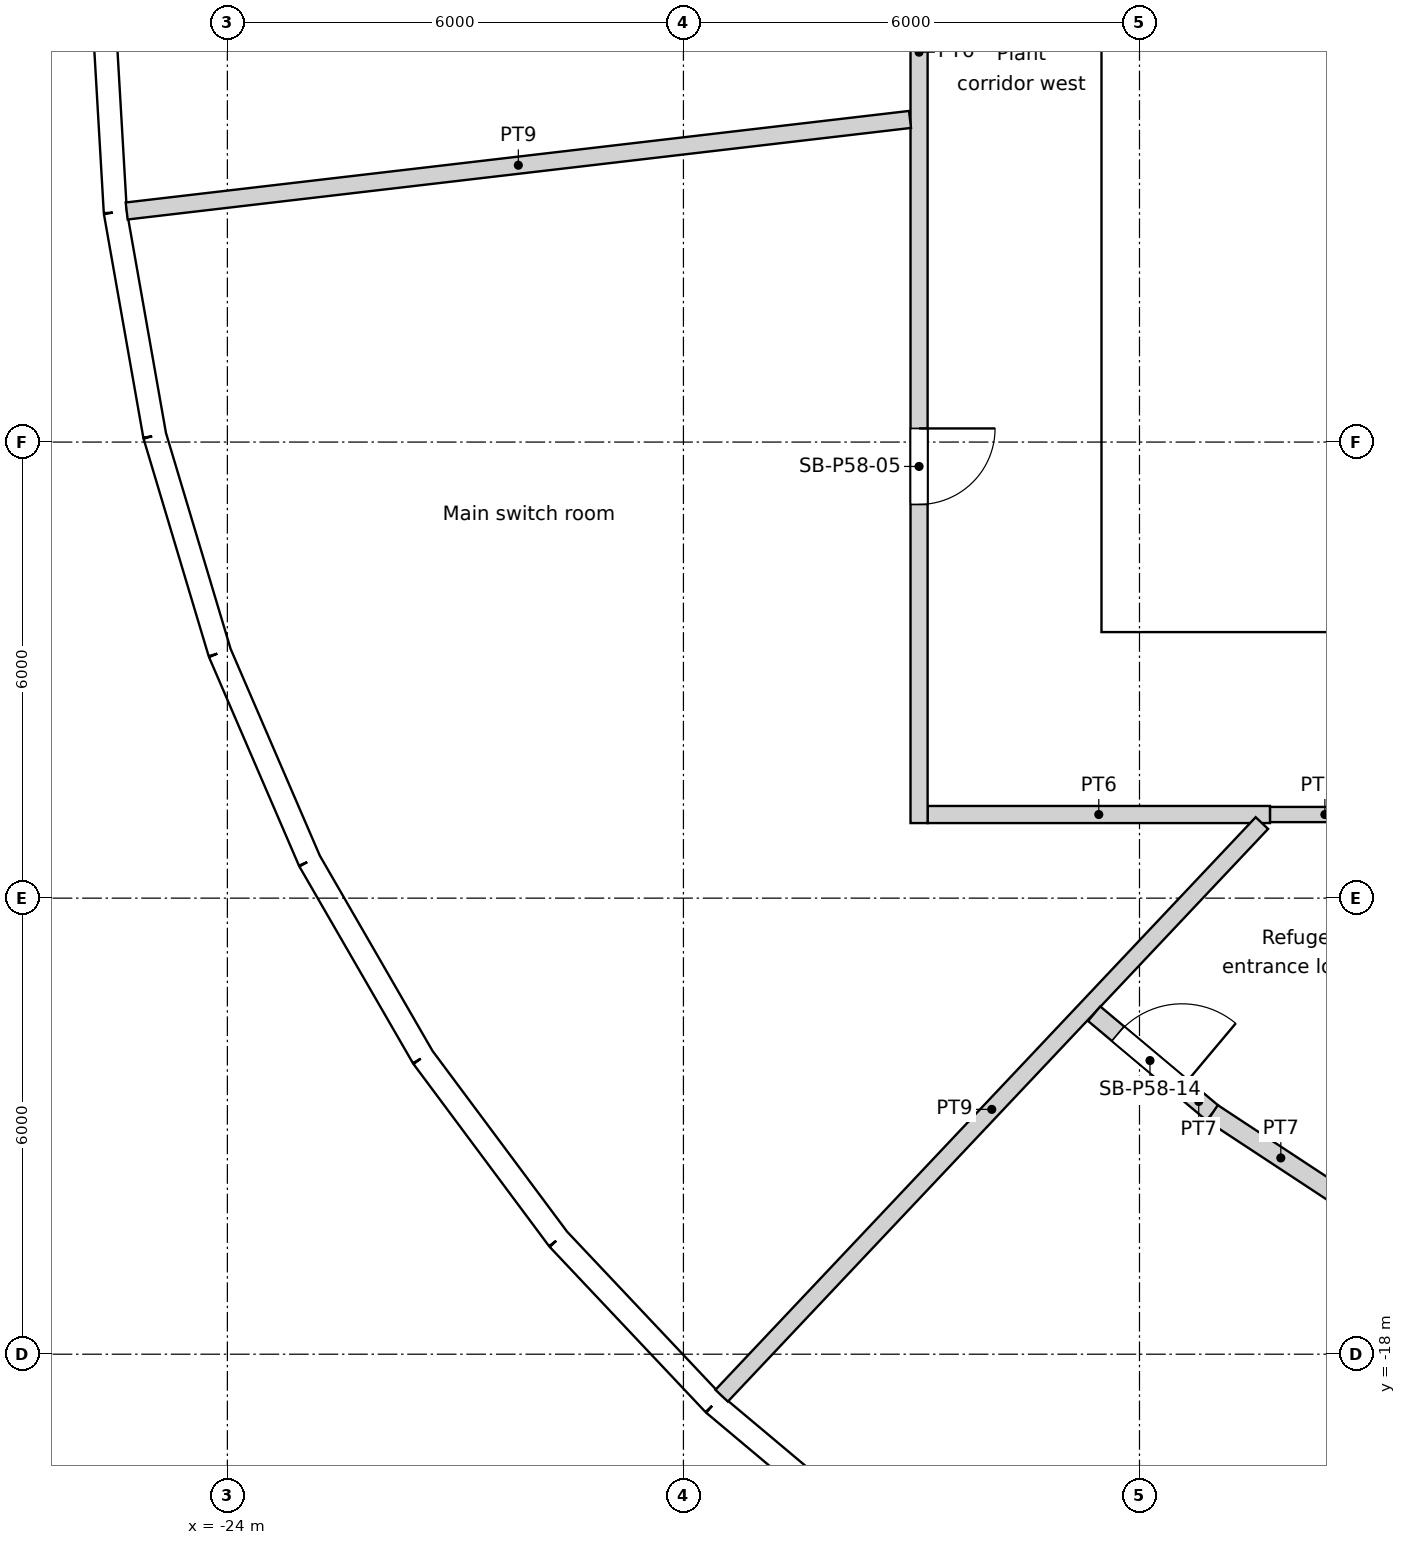
"""IFC4 building model, lengths in metres.
Left out: names, types, materials, properties, quantities, classifications, styles, units other than length and angle.
Written with IfcOpenShell. Run it as: python <this file> out.ifc"""

import sys

from ifc_helpers import new_model, si_unit, direction, frame, frame_2d, origin, origin_2d, place, context, subcontext, project, spatial, rectangle, circle, extrude, element, fill, save


model = new_model("IFC4")
c1 = context("Model", 3, precision=1e-05, world=origin(), true_north=direction((0.0, 1.0)))
c2 = subcontext(c1, "Body", "Model", "MODEL_VIEW")
j1 = project(units=[si_unit("LENGTHUNIT", "METRE"), si_unit("PLANEANGLEUNIT", "RADIAN")], contexts=[c1])
p1 = place(None, origin())
s1 = spatial("IfcSite", under=j1, at=p1, CompositionType="ELEMENT")
p2 = place(p1, origin())
s2 = spatial("IfcBuilding", under=s1, at=p2, CompositionType="ELEMENT")
p3 = place(p2, frame((0.0, 0.0, 225.0)))
s3 = spatial("IfcBuildingStorey", under=s2, at=p3, CompositionType="ELEMENT", Elevation=225.0)
for number, where, z_axis, x_axis in (
    (1, (-24.382, -2.85, 0.0), (0.0, 0.0, 1.0), (1.0, 0.0, 0.0)),
    (2, (-23.067, -8.396, 0.0), (0.0, 0.0, 1.0), (1.0, 0.0, 0.0)),
    (3, (-20.509, -13.489, 0.0), (0.0, 0.0, 1.0), (1.0, 0.0, 0.0)),
    (4, (-16.846, -17.855, 0.0), (0.0, 0.0, 1.0), (1.0, 0.0, 0.0)),
):
    element("IfcColumn", number, at=place(p3, frame(where, z_axis=z_axis, x_axis=x_axis)), inside=s3, PredefinedType="COLUMN", context=c2, shape_type="SweptSolid", body=[
        extrude(circle(Radius=0.6, at=origin_2d()), origin(), (0.0, 0.0, 1.0), 6.0),
    ])
for number, where, z_axis, x_axis in (
    (5, (-18.612, -2.805, 0.0), (0.0, 0.0, 1.0), (1.0, 0.0, 0.0)),
    (6, (-16.958, -8.167, 0.0), (0.0, 0.0, 1.0), (1.0, 0.0, 0.0)),
    (7, (-13.798, -12.802, 0.0), (0.0, 0.0, 1.0), (1.0, 0.0, 0.0)),
    (8, (-9.411, -16.301, 0.0), (0.0, 0.0, 1.0), (1.0, 0.0, 0.0)),
):
    element("IfcColumn", number, at=place(p3, frame(where, z_axis=z_axis, x_axis=x_axis)), inside=s3, PredefinedType="COLUMN", context=c2, shape_type="SweptSolid", body=[
        extrude(circle(Radius=0.65, at=origin_2d()), origin(), (0.0, 0.0, 1.0), 6.0),
    ])
p4 = place(p3, frame((-25.647, 0.0, 0.0), z_axis=(0.0, 0.0, 1.0), x_axis=(0.058117409476, -0.998309754894, 0.0)))
e9 = element("IfcWall", 9, at=p4, inside=s3, PredefinedType="SOLIDWALL", context=c2, shape_type="SweptSolid", body=[
    extrude(rectangle(XDim=2.983, YDim=0.3, at=frame_2d((1.491, 0.0))), origin(), (0.0, 0.0, 1.0), 5.65),
])
p5 = place(p4, frame((1.491, 0.0, 1.825)))
e10 = element("IfcOpeningElement", 10, at=p5, cuts=e9, PredefinedType="OPENING", context=c2, shape_type="SweptSolid", body=[
    extrude(circle(Radius=1.2, at=origin_2d()), frame((0.0, 0.16, 0.0), z_axis=(0.0, -1.0, 0.0), x_axis=(1.0, 0.0, 0.0)), (0.0, 0.0, 1.0), 0.32),
])
p6 = place(p3, frame((-25.474, -2.978, 0.0), z_axis=(0.0, 0.0, 1.0), x_axis=(0.17369661102, -0.984799211677, 0.0)))
e11 = element("IfcWall", 11, at=p6, inside=s3, PredefinedType="SOLIDWALL", context=c2, shape_type="SweptSolid", body=[
    extrude(rectangle(XDim=2.983, YDim=0.3, at=frame_2d((1.491, 0.0))), origin(), (0.0, 0.0, 1.0), 5.65),
])
p7 = place(p6, frame((1.491, 0.0, 1.825)))
e12 = element("IfcOpeningElement", 12, at=p7, cuts=e11, PredefinedType="OPENING", context=c2, shape_type="SweptSolid", body=[
    extrude(circle(Radius=1.2, at=origin_2d()), frame((0.0, 0.16, 0.0), z_axis=(0.0, -1.0, 0.0), x_axis=(1.0, 0.0, 0.0)), (0.0, 0.0, 1.0), 0.32),
])
p8 = place(p3, frame((-24.956, -5.915, 0.0), z_axis=(0.0, 0.0, 1.0), x_axis=(0.286754535355, -0.958004089998, 0.0)))
e13 = element("IfcWall", 13, at=p8, inside=s3, PredefinedType="SOLIDWALL", context=c2, shape_type="SweptSolid", body=[
    extrude(rectangle(XDim=2.982, YDim=0.3, at=frame_2d((1.491, 0.0))), origin(), (0.0, 0.0, 1.0), 5.65),
])
p9 = place(p8, frame((1.491, 0.0, 1.825)))
e14 = element("IfcOpeningElement", 14, at=p9, cuts=e13, PredefinedType="OPENING", context=c2, shape_type="SweptSolid", body=[
    extrude(circle(Radius=1.2, at=origin_2d()), frame((0.0, 0.16, 0.0), z_axis=(0.0, -1.0, 0.0), x_axis=(1.0, 0.0, 0.0)), (0.0, 0.0, 1.0), 0.32),
])
p10 = place(p3, frame((-24.101, -8.772, 0.0), z_axis=(0.0, 0.0, 1.0), x_axis=(0.396111410027, -0.918202456349, 0.0)))
e15 = element("IfcWall", 15, at=p10, inside=s3, PredefinedType="SOLIDWALL", context=c2, shape_type="SweptSolid", body=[
    extrude(rectangle(XDim=2.982, YDim=0.3, at=frame_2d((1.491, 0.0))), origin(), (0.0, 0.0, 1.0), 5.65),
])
p11 = place(p10, frame((1.491, 0.0, 1.825)))
e16 = element("IfcOpeningElement", 16, at=p11, cuts=e15, PredefinedType="OPENING", context=c2, shape_type="SweptSolid", body=[
    extrude(circle(Radius=1.2, at=origin_2d()), frame((0.0, 0.16, 0.0), z_axis=(0.0, -1.0, 0.0), x_axis=(1.0, 0.0, 0.0)), (0.0, 0.0, 1.0), 0.32),
])
p12 = place(p3, frame((-22.919, -11.51, 0.0), z_axis=(0.0, 0.0, 1.0), x_axis=(0.499977539641, -0.866038370891, 0.0)))
e17 = element("IfcWall", 17, at=p12, inside=s3, PredefinedType="SOLIDWALL", context=c2, shape_type="SweptSolid", body=[
    extrude(rectangle(XDim=2.983, YDim=0.3, at=frame_2d((1.491, 0.0))), origin(), (0.0, 0.0, 1.0), 5.65),
])
p13 = place(p12, frame((1.491, 0.0, 1.825)))
e18 = element("IfcOpeningElement", 18, at=p13, cuts=e17, PredefinedType="OPENING", context=c2, shape_type="SweptSolid", body=[
    extrude(circle(Radius=1.2, at=origin_2d()), frame((0.0, 0.16, 0.0), z_axis=(0.0, -1.0, 0.0), x_axis=(1.0, 0.0, 0.0)), (0.0, 0.0, 1.0), 0.32),
])
p14 = place(p3, frame((-21.428, -14.094, 0.0), z_axis=(0.0, 0.0, 1.0), x_axis=(0.597206768034, -0.802087324557, 0.0)))
e19 = element("IfcWall", 19, at=p14, inside=s3, PredefinedType="SOLIDWALL", context=c2, shape_type="SweptSolid", body=[
    extrude(rectangle(XDim=2.983, YDim=0.3, at=frame_2d((1.491, 0.0))), origin(), (0.0, 0.0, 1.0), 5.65),
])
p15 = place(p14, frame((1.491, 0.0, 1.825)))
e20 = element("IfcOpeningElement", 20, at=p15, cuts=e19, PredefinedType="OPENING", context=c2, shape_type="SweptSolid", body=[
    extrude(circle(Radius=1.2, at=origin_2d()), frame((0.0, 0.16, 0.0), z_axis=(0.0, -1.0, 0.0), x_axis=(1.0, 0.0, 0.0)), (0.0, 0.0, 1.0), 0.32),
])
p16 = place(p3, frame((-19.647, -16.486, 0.0), z_axis=(0.0, 0.0, 1.0), x_axis=(0.686219609698, -0.72739442345, 0.0)))
e21 = element("IfcWall", 21, at=p16, inside=s3, PredefinedType="SOLIDWALL", context=c2, shape_type="SweptSolid", body=[
    extrude(rectangle(XDim=2.982, YDim=0.3, at=frame_2d((1.491, 0.0))), origin(), (0.0, 0.0, 1.0), 5.65),
])
p17 = place(p16, frame((1.491, 0.0, 1.825)))
e22 = element("IfcOpeningElement", 22, at=p17, cuts=e21, PredefinedType="OPENING", context=c2, shape_type="SweptSolid", body=[
    extrude(circle(Radius=1.2, at=origin_2d()), frame((0.0, 0.16, 0.0), z_axis=(0.0, -1.0, 0.0), x_axis=(1.0, 0.0, 0.0)), (0.0, 0.0, 1.0), 0.32),
])
p18 = place(p3, frame((-17.6, -18.655, 0.0), z_axis=(0.0, 0.0, 1.0), x_axis=(0.766015999952, -0.64282150541, 0.0)))
e23 = element("IfcWall", 23, at=p18, inside=s3, PredefinedType="SOLIDWALL", context=c2, shape_type="SweptSolid", body=[
    extrude(rectangle(XDim=2.982, YDim=0.3, at=frame_2d((1.491, 0.0))), origin(), (0.0, 0.0, 1.0), 5.65),
])
p19 = place(p18, frame((1.491, 0.0, 1.825)))
e24 = element("IfcOpeningElement", 24, at=p19, cuts=e23, PredefinedType="OPENING", context=c2, shape_type="SweptSolid", body=[
    extrude(circle(Radius=1.2, at=origin_2d()), frame((0.0, 0.16, 0.0), z_axis=(0.0, -1.0, 0.0), x_axis=(1.0, 0.0, 0.0)), (0.0, 0.0, 1.0), 0.32),
])
p20 = place(p3, frame((-12.5, -8.05, 0.0), z_axis=(0.0, 0.0, 1.0), x_axis=(1.0, 0.0, 0.0)))
e25 = element("IfcWall", 25, at=p20, inside=s3, PredefinedType="SOLIDWALL", context=c2, shape_type="SweptSolid", body=[
    extrude(rectangle(XDim=25.0, YDim=0.9, at=frame_2d((12.5, 0.0))), origin(), (0.0, 0.0, 1.0), 5.65),
])
p21 = place(p20, frame((13.4, 0.0, 0.0)))
e26 = element("IfcOpeningElement", 26, at=p21, cuts=e25, PredefinedType="OPENING", context=c2, shape_type="SweptSolid", body=[
    extrude(rectangle(XDim=1.0, YDim=2.1, at=frame_2d((0.5, 1.05))), frame((0.0, 0.45, 0.0), z_axis=(0.0, -1.0, 0.0), x_axis=(1.0, 0.0, 0.0)), (0.0, 0.0, 1.0), 0.9),
])
p22 = place(p20, frame((8.3, 0.0, 0.0)))
e27 = element("IfcOpeningElement", 27, at=p22, cuts=e25, PredefinedType="OPENING", context=c2, shape_type="SweptSolid", body=[
    extrude(rectangle(XDim=1.8, YDim=2.1, at=frame_2d((0.9, 1.05))), frame((0.0, 0.45, 0.0), z_axis=(0.0, -1.0, 0.0), x_axis=(1.0, 0.0, 0.0)), (0.0, 0.0, 1.0), 0.9),
])
p23 = place(p20, frame((14.9, 0.0, 0.0)))
e28 = element("IfcOpeningElement", 28, at=p23, cuts=e25, PredefinedType="OPENING", context=c2, shape_type="SweptSolid", body=[
    extrude(rectangle(XDim=1.8, YDim=2.1, at=frame_2d((0.9, 1.05))), frame((0.0, 0.45, 0.0), z_axis=(0.0, -1.0, 0.0), x_axis=(1.0, 0.0, 0.0)), (0.0, 0.0, 1.0), 0.9),
])
p24 = place(p3, frame((-12.05, -7.6, 0.0), z_axis=(0.0, 0.0, 1.0), x_axis=(0.0, 1.0, 0.0)))
e29 = element("IfcWall", 29, at=p24, inside=s3, PredefinedType="SOLIDWALL", context=c2, shape_type="SweptSolid", body=[
    extrude(rectangle(XDim=15.2, YDim=0.9, at=frame_2d((7.6, 0.0))), origin(), (0.0, 0.0, 1.0), 5.65),
])
p25 = place(p24, frame((7.1, 0.0, 0.0)))
e30 = element("IfcOpeningElement", 30, at=p25, cuts=e29, PredefinedType="OPENING", context=c2, shape_type="SweptSolid", body=[
    extrude(rectangle(XDim=1.0, YDim=2.1, at=frame_2d((0.5, 1.05))), frame((0.0, 0.45, 0.0), z_axis=(0.0, -1.0, 0.0), x_axis=(1.0, 0.0, 0.0)), (0.0, 0.0, 1.0), 0.9),
])
p26 = place(p3, frame((-11.6, -4.55, 0.0), z_axis=(0.0, 0.0, 1.0), x_axis=(1.0, 0.0, 0.0)))
e31 = element("IfcWall", 31, at=p26, inside=s3, PredefinedType="SOLIDWALL", context=c2, shape_type="SweptSolid", body=[
    extrude(rectangle(XDim=2.4, YDim=0.3, at=frame_2d((1.2, 0.0))), origin(), (0.0, 0.0, 1.0), 5.65),
])
p27 = place(p26, frame((0.6, 0.0, 0.0)))
e32 = element("IfcOpeningElement", 32, at=p27, cuts=e31, PredefinedType="OPENING", context=c2, shape_type="SweptSolid", body=[
    extrude(rectangle(XDim=1.2, YDim=2.1, at=frame_2d((0.6, 1.05))), frame((0.0, 0.15, 0.0), z_axis=(0.0, -1.0, 0.0), x_axis=(1.0, 0.0, 0.0)), (0.0, 0.0, 1.0), 0.3),
])
p28 = place(p3, frame((-25.325, -2.96, 0.0), z_axis=(0.0, 0.0, 1.0), x_axis=(0.993240732078, 0.116072598582, 0.0)))
e33 = element("IfcWall", 33, at=p28, inside=s3, PredefinedType="PARTITIONING", context=c2, shape_type="SweptSolid", body=[
    extrude(rectangle(XDim=10.376, YDim=0.225, at=frame_2d((5.188, 0.0))), origin(), (0.0, 0.0, 1.0), 2.7),
])
p29 = place(p3, frame((-17.497, -18.546, 0.0), z_axis=(0.0, 0.0, 1.0), x_axis=(0.686253135809, 0.727362793654, 0.0)))
e34 = element("IfcWall", 34, at=p29, inside=s3, PredefinedType="PARTITIONING", context=c2, shape_type="SweptSolid", body=[
    extrude(rectangle(XDim=10.357, YDim=0.225, at=frame_2d((5.179, 0.0))), origin(), (0.0, 0.0, 1.0), 2.7),
])
p30 = place(p3, frame((-14.788, -10.9, 0.0), z_axis=(0.0, 0.0, 1.0), x_axis=(1.0, 0.0, 0.0)))
e35 = element("IfcWall", 35, at=p30, inside=s3, PredefinedType="PARTITIONING", context=c2, shape_type="SweptSolid", body=[
    extrude(rectangle(XDim=4.504, YDim=0.225, at=frame_2d((2.252, 0.0))), origin(), (0.0, 0.0, 1.0), 5.2),
])
p31 = place(p3, frame((-14.9, 10.788, 0.0), z_axis=(0.0, 0.0, 1.0), x_axis=(0.0, -1.0, 0.0)))
e36 = element("IfcWall", 36, at=p31, inside=s3, PredefinedType="PARTITIONING", context=c2, shape_type="SweptSolid", body=[
    extrude(rectangle(XDim=21.8, YDim=0.225, at=frame_2d((10.9, 0.0))), origin(), (0.0, 0.0, 1.0), 5.2),
])
p32 = place(p31, frame((5.708, 0.0, 0.0)))
e37 = element("IfcOpeningElement", 37, at=p32, cuts=e36, PredefinedType="OPENING", context=c2, shape_type="SweptSolid", body=[
    extrude(rectangle(XDim=1.0, YDim=2.1, at=frame_2d((0.5, 1.05))), frame((0.0, 0.113, 0.0), z_axis=(0.0, -1.0, 0.0), x_axis=(1.0, 0.0, 0.0)), (0.0, 0.0, 1.0), 0.225),
])
p33 = place(p31, frame((16.608, 0.0, 0.0)))
e38 = element("IfcOpeningElement", 38, at=p33, cuts=e36, PredefinedType="OPENING", context=c2, shape_type="SweptSolid", body=[
    extrude(rectangle(XDim=1.0, YDim=2.1, at=frame_2d((0.5, 1.05))), frame((0.0, 0.113, 0.0), z_axis=(0.0, -1.0, 0.0), x_axis=(1.0, 0.0, 0.0)), (0.0, 0.0, 1.0), 0.225),
])
p34 = place(p3, frame((-11.039, -14.827, 0.0), z_axis=(0.0, 0.0, 1.0), x_axis=(-0.766021768974, 0.642814630713, 0.0)))
e39 = element("IfcWall", 39, at=p34, inside=s3, PredefinedType="PARTITIONING", context=c2, shape_type="SweptSolid", body=[
    extrude(rectangle(XDim=2.033, YDim=0.25, at=frame_2d((1.017, 0.0))), origin(), (0.0, 0.0, 1.0), 5.2),
])
p35 = place(p34, frame((0.525, 0.0, 0.0)))
e40 = element("IfcOpeningElement", 40, at=p35, cuts=e39, PredefinedType="OPENING", context=c2, shape_type="SweptSolid", body=[
    extrude(rectangle(XDim=1.1, YDim=2.1, at=frame_2d((0.55, 1.05))), frame((0.0, 0.125, 0.0), z_axis=(0.0, -1.0, 0.0), x_axis=(1.0, 0.0, 0.0)), (0.0, 0.0, 1.0), 0.25),
])
p36 = place(p3, frame((-11.039, -14.827, 0.0), z_axis=(0.0, 0.0, 1.0), x_axis=(0.835476081401, -0.549526812274, 0.0)))
e41 = element("IfcWall", 41, at=p36, inside=s3, PredefinedType="PARTITIONING", context=c2, shape_type="SweptSolid", body=[
    extrude(rectangle(XDim=2.15, YDim=0.25, at=frame_2d((1.075, 0.0))), origin(), (0.0, 0.0, 1.0), 5.2),
])
p37 = place(p3, frame((-10.284, -10.9, 0.0), z_axis=(0.0, 0.0, 1.0), x_axis=(1.0, 0.0, 0.0)))
e42 = element("IfcWall", 42, at=p37, inside=s3, PredefinedType="PARTITIONING", context=c2, shape_type="SweptSolid", body=[
    extrude(rectangle(XDim=3.99, YDim=0.2, at=frame_2d((1.995, 0.0))), origin(), (0.0, 0.0, 1.0), 5.2),
])
p38 = place(p37, frame((1.495, 0.0, 0.0)))
e43 = element("IfcOpeningElement", 43, at=p38, cuts=e42, PredefinedType="OPENING", context=c2, shape_type="SweptSolid", body=[
    extrude(rectangle(XDim=1.0, YDim=2.1, at=frame_2d((0.5, 1.05))), frame((0.0, 0.1, 0.0), z_axis=(0.0, -1.0, 0.0), x_axis=(1.0, 0.0, 0.0)), (0.0, 0.0, 1.0), 0.2),
])
p39 = place(p5, origin())
e44 = element("IfcWindow", 44, at=p39, inside=s3, PartitioningType="SINGLE_PANEL", PredefinedType="WINDOW", context=c2, shape_type="SweptSolid", body=[
    extrude(circle(Radius=1.2, at=origin_2d()), frame((0.0, 0.12, 0.0), z_axis=(0.0, -1.0, 0.0), x_axis=(1.0, 0.0, 0.0)), (0.0, 0.0, 1.0), 0.1),
])
fill(e10, e44)
p40 = place(p7, origin())
e45 = element("IfcWindow", 45, at=p40, inside=s3, PartitioningType="SINGLE_PANEL", PredefinedType="WINDOW", context=c2, shape_type="SweptSolid", body=[
    extrude(circle(Radius=1.2, at=origin_2d()), frame((0.0, 0.12, 0.0), z_axis=(0.0, -1.0, 0.0), x_axis=(1.0, 0.0, 0.0)), (0.0, 0.0, 1.0), 0.1),
])
fill(e12, e45)
p41 = place(p9, origin())
e46 = element("IfcWindow", 46, at=p41, inside=s3, PartitioningType="SINGLE_PANEL", PredefinedType="WINDOW", context=c2, shape_type="SweptSolid", body=[
    extrude(circle(Radius=1.2, at=origin_2d()), frame((0.0, 0.12, 0.0), z_axis=(0.0, -1.0, 0.0), x_axis=(1.0, 0.0, 0.0)), (0.0, 0.0, 1.0), 0.1),
])
fill(e14, e46)
p42 = place(p11, origin())
e47 = element("IfcWindow", 47, at=p42, inside=s3, PartitioningType="SINGLE_PANEL", PredefinedType="WINDOW", context=c2, shape_type="SweptSolid", body=[
    extrude(circle(Radius=1.2, at=origin_2d()), frame((0.0, 0.12, 0.0), z_axis=(0.0, -1.0, 0.0), x_axis=(1.0, 0.0, 0.0)), (0.0, 0.0, 1.0), 0.1),
])
fill(e16, e47)
p43 = place(p13, origin())
e48 = element("IfcWindow", 48, at=p43, inside=s3, PartitioningType="SINGLE_PANEL", PredefinedType="WINDOW", context=c2, shape_type="SweptSolid", body=[
    extrude(circle(Radius=1.2, at=origin_2d()), frame((0.0, 0.12, 0.0), z_axis=(0.0, -1.0, 0.0), x_axis=(1.0, 0.0, 0.0)), (0.0, 0.0, 1.0), 0.1),
])
fill(e18, e48)
p44 = place(p15, origin())
e49 = element("IfcWindow", 49, at=p44, inside=s3, PartitioningType="SINGLE_PANEL", PredefinedType="WINDOW", context=c2, shape_type="SweptSolid", body=[
    extrude(circle(Radius=1.2, at=origin_2d()), frame((0.0, 0.12, 0.0), z_axis=(0.0, -1.0, 0.0), x_axis=(1.0, 0.0, 0.0)), (0.0, 0.0, 1.0), 0.1),
])
fill(e20, e49)
p45 = place(p17, origin())
e50 = element("IfcWindow", 50, at=p45, inside=s3, PartitioningType="SINGLE_PANEL", PredefinedType="WINDOW", context=c2, shape_type="SweptSolid", body=[
    extrude(circle(Radius=1.2, at=origin_2d()), frame((0.0, 0.12, 0.0), z_axis=(0.0, -1.0, 0.0), x_axis=(1.0, 0.0, 0.0)), (0.0, 0.0, 1.0), 0.1),
])
fill(e22, e50)
p46 = place(p19, origin())
e51 = element("IfcWindow", 51, at=p46, inside=s3, PartitioningType="SINGLE_PANEL", PredefinedType="WINDOW", context=c2, shape_type="SweptSolid", body=[
    extrude(circle(Radius=1.2, at=origin_2d()), frame((0.0, 0.12, 0.0), z_axis=(0.0, -1.0, 0.0), x_axis=(1.0, 0.0, 0.0)), (0.0, 0.0, 1.0), 0.1),
])
fill(e24, e51)
p47 = place(p27, origin())
e52 = element("IfcDoor", 52, at=p47, inside=s3, OperationType="SINGLE_SWING_LEFT", PredefinedType="DOOR", context=c2, shape_type="SweptSolid", body=[
    extrude(rectangle(XDim=1.2, YDim=2.1, at=frame_2d((0.6, 1.05))), frame((0.0, 0.025, 0.0), z_axis=(0.0, -1.0, 0.0), x_axis=(1.0, 0.0, 0.0)), (0.0, 0.0, 1.0), 0.05),
])
fill(e32, e52)
p48 = place(p33, origin())
e53 = element("IfcDoor", 53, at=p48, inside=s3, OperationType="SINGLE_SWING_LEFT", PredefinedType="DOOR", context=c2, shape_type="SweptSolid", body=[
    extrude(rectangle(XDim=1.0, YDim=2.1, at=frame_2d((0.5, 1.05))), frame((0.0, 0.025, 0.0), z_axis=(0.0, -1.0, 0.0), x_axis=(1.0, 0.0, 0.0)), (0.0, 0.0, 1.0), 0.05),
])
fill(e38, e53)
p49 = place(p35, origin())
e54 = element("IfcDoor", 54, at=p49, inside=s3, OperationType="SINGLE_SWING_RIGHT", PredefinedType="DOOR", context=c2, shape_type="SweptSolid", body=[
    extrude(rectangle(XDim=1.1, YDim=2.1, at=frame_2d((0.55, 1.05))), frame((0.0, 0.025, 0.0), z_axis=(0.0, -1.0, 0.0), x_axis=(1.0, 0.0, 0.0)), (0.0, 0.0, 1.0), 0.05),
])
fill(e40, e54)
save(model, sys.argv[1])
